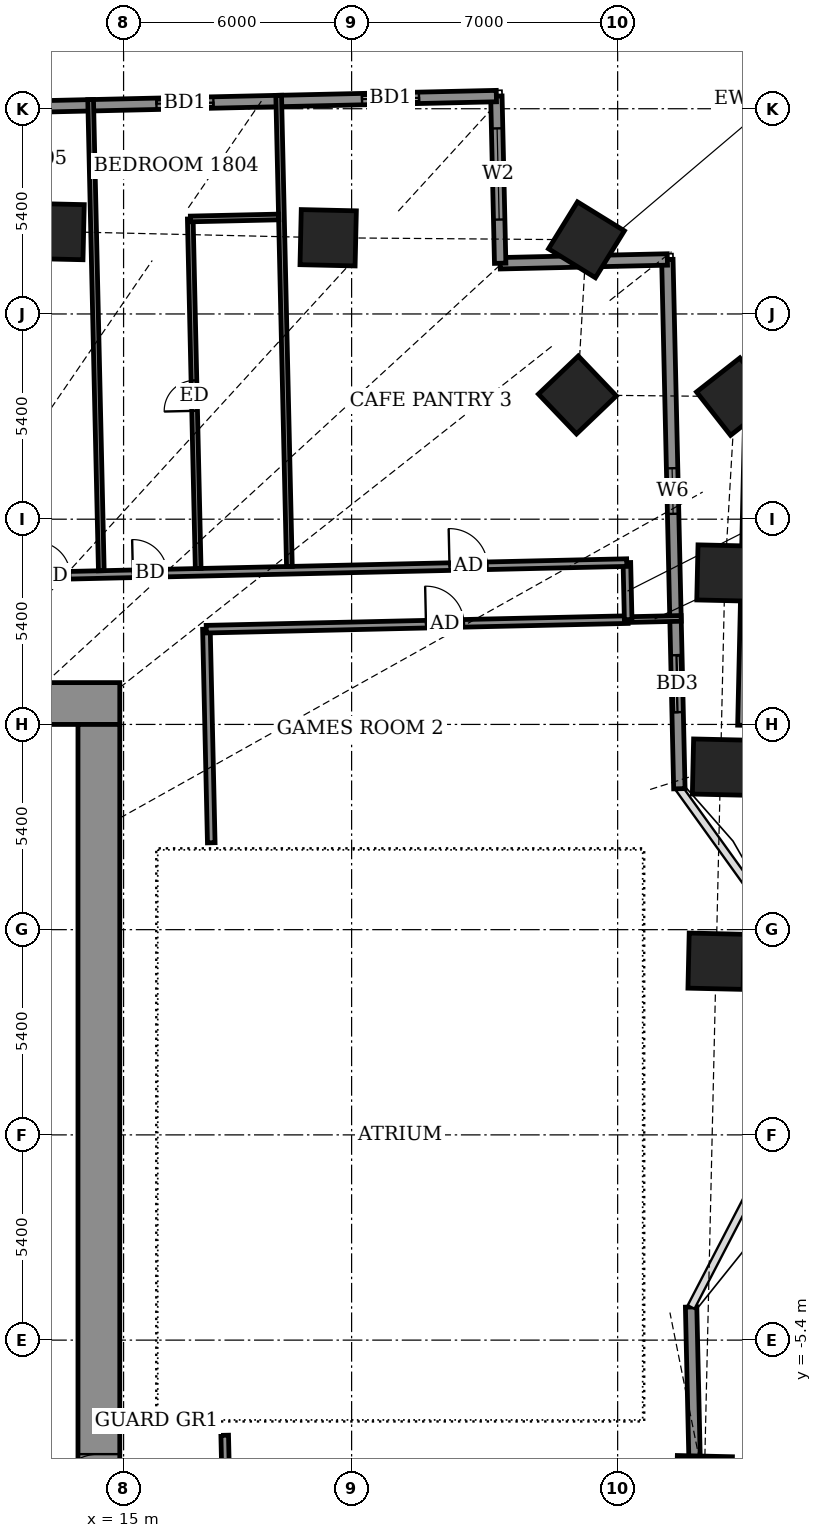
"""IFC4 building model, lengths in metres.
Left out: names, types, materials, properties, quantities, classifications, styles, units other than length and angle.
Written with IfcOpenShell. Run it as: python <this file> out.ifc"""

import sys

from ifc_helpers import new_model, si_unit, direction, frame, frame_2d, origin, origin_2d, place, context, subcontext, project, spatial, rectangle, extrude, element, fill, save


model = new_model("IFC4")
c1 = context("Model", 3, precision=1e-05, world=origin(), true_north=direction((0.0, 1.0)))
c2 = subcontext(c1, "Body", "Model", "MODEL_VIEW")
j1 = project(units=[si_unit("LENGTHUNIT", "METRE"), si_unit("PLANEANGLEUNIT", "RADIAN")], contexts=[c1])
p1 = place(None, origin())
s1 = spatial("IfcSite", under=j1, at=p1, CompositionType="ELEMENT")
p2 = place(p1, origin())
s2 = spatial("IfcBuilding", under=s1, at=p2, CompositionType="ELEMENT")
p3 = place(p2, frame((0.0, 0.0, 74.7)))
s3 = spatial("IfcBuildingStorey", under=s2, at=p3, CompositionType="ELEMENT", Elevation=74.7)
for number, where, z_axis, x_axis in (
    (1, (30.279, -9.177, -0.55), (0.0, 0.0, 1.0), (0.023, 1.0, 0.0)),
    (2, (30.591, 4.569, -0.55), (0.0, 0.0, 1.0), (0.023, 1.0, 0.0)),
    (3, (30.707, 9.677, -0.55), (0.0, 0.0, 1.0), (0.023, 1.0, 0.0)),
    (4, (30.823, 14.783, -0.55), (0.0, 0.0, 1.0), (0.023, 1.0, 0.0)),
    (5, (31.094, 19.425, -0.55), (0.0, 0.0, 1.0), (-0.617, 0.787, 0.0)),
    (6, (26.941, 19.468, -0.55), (0.0, 0.0, 1.0), (-0.691, 0.723, 0.0)),
    (7, (27.179, 23.551, -0.55), (0.0, 0.0, 1.0), (-0.851, 0.525, 0.0)),
    (8, (20.384, 23.605, -0.55), (0.0, 0.0, 1.0), (-1.0, 0.023, 0.0)),
    (9, (13.224, 23.768, -0.55), (0.0, 0.0, 1.0), (-1.0, 0.023, 0.0)),
):
    element("IfcColumn", number, at=place(p3, frame(where, z_axis=z_axis, x_axis=x_axis)), inside=s3, PredefinedType="COLUMN", context=c2, shape_type="SweptSolid", body=[
        extrude(rectangle(XDim=1.45, YDim=1.45, at=origin_2d()), origin(), (0.0, 0.0, 1.0), 4.6),
    ])
p4 = place(p3, frame((30.227, -17.455, 0.0), z_axis=(0.0, 0.0, 1.0), x_axis=(-0.022734702163, 0.999741533256, 0.0)))
e10 = element("IfcWall", 10, at=p4, inside=s3, PredefinedType="SOLIDWALL", context=c2, shape_type="SweptSolid", body=[
    extrude(rectangle(XDim=12.929, YDim=0.3, at=frame_2d((6.465, 0.0))), origin(), (0.0, 0.0, 1.0), 2.45),
])
p5 = place(p4, frame((2.863, 0.0, 0.0)))
e11 = element("IfcOpeningElement", 11, at=p5, cuts=e10, PredefinedType="OPENING", context=c2, shape_type="SweptSolid", body=[
    extrude(rectangle(XDim=1.5, YDim=2.4, at=frame_2d((0.75, 1.2))), frame((0.0, 0.16, 0.0), z_axis=(0.0, -1.0, 0.0), x_axis=(1.0, 0.0, 0.0)), (0.0, 0.0, 1.0), 0.32),
])
p6 = place(p4, frame((6.059, 0.0, 0.9)))
e12 = element("IfcOpeningElement", 12, at=p6, cuts=e10, PredefinedType="OPENING", context=c2, shape_type="SweptSolid", body=[
    extrude(rectangle(XDim=1.2, YDim=1.5, at=frame_2d((0.6, 0.75))), frame((0.0, 0.16, 0.0), z_axis=(0.0, -1.0, 0.0), x_axis=(1.0, 0.0, 0.0)), (0.0, 0.0, 1.0), 0.32),
])
p7 = place(p3, frame((29.624, 9.108, 0.0), z_axis=(0.0, 0.0, 1.0), x_axis=(-0.022679601751, 0.999742784752, 0.0)))
e13 = element("IfcWall", 13, at=p7, inside=s3, PredefinedType="SOLIDWALL", context=c2, shape_type="SweptSolid", body=[
    extrude(rectangle(XDim=13.93, YDim=0.3, at=frame_2d((6.965, 0.0))), origin(), (0.0, 0.0, 1.0), 2.25),
])
p8 = place(p7, frame((2.015, 0.0, 0.0)))
e14 = element("IfcOpeningElement", 14, at=p8, cuts=e13, PredefinedType="OPENING", context=c2, shape_type="SweptSolid", body=[
    extrude(rectangle(XDim=1.5, YDim=2.0, at=frame_2d((0.75, 1.0))), frame((0.0, 0.16, 0.0), z_axis=(0.0, -1.0, 0.0), x_axis=(1.0, 0.0, 0.0)), (0.0, 0.0, 1.0), 0.32),
])
p9 = place(p7, frame((7.235, 0.0, 0.5)))
e15 = element("IfcOpeningElement", 15, at=p9, cuts=e13, PredefinedType="OPENING", context=c2, shape_type="SweptSolid", body=[
    extrude(rectangle(XDim=1.2, YDim=1.1, at=frame_2d((0.6, 0.55))), frame((0.0, 0.16, 0.0), z_axis=(0.0, -1.0, 0.0), x_axis=(1.0, 0.0, 0.0)), (0.0, 0.0, 1.0), 0.32),
])
p10 = place(p3, frame((29.308, 23.034, 0.0), z_axis=(0.0, 0.0, 1.0), x_axis=(-0.999742493928, -0.022692418004, 0.0)))
e16 = element("IfcWall", 16, at=p10, inside=s3, PredefinedType="SOLIDWALL", context=c2, shape_type="SweptSolid", body=[
    extrude(rectangle(XDim=4.4, YDim=0.3, at=frame_2d((2.2, 0.0))), origin(), (0.0, 0.0, 1.0), 2.45),
])
p11 = place(p3, frame((24.909, 22.934, 0.0), z_axis=(0.0, 0.0, 1.0), x_axis=(-0.022693676786, 0.999742465355, 0.0)))
e17 = element("IfcWall", 17, at=p11, inside=s3, PredefinedType="SOLIDWALL", context=c2, shape_type="SweptSolid", body=[
    extrude(rectangle(XDim=4.4, YDim=0.3, at=frame_2d((2.2, 0.0))), origin(), (0.0, 0.0, 1.0), 2.45),
])
p12 = place(p11, frame((1.15, 0.0, 0.9)))
e18 = element("IfcOpeningElement", 18, at=p12, cuts=e17, PredefinedType="OPENING", context=c2, shape_type="SweptSolid", body=[
    extrude(rectangle(XDim=2.4, YDim=1.5, at=frame_2d((1.2, 0.75))), frame((0.0, 0.16, 0.0), z_axis=(0.0, -1.0, 0.0), x_axis=(1.0, 0.0, 0.0)), (0.0, 0.0, 1.0), 0.32),
])
p13 = place(p3, frame((24.809, 27.333, 0.0), z_axis=(0.0, 0.0, 1.0), x_axis=(-0.999742489858, -0.022692597327, 0.0)))
e19 = element("IfcWall", 19, at=p13, inside=s3, PredefinedType="SOLIDWALL", context=c2, shape_type="SweptSolid", body=[
    extrude(rectangle(XDim=46.972, YDim=0.3, at=frame_2d((23.486, 0.0))), origin(), (0.0, 0.0, 1.0), 2.45),
])
p14 = place(p13, frame((2.036, 0.0, 0.0)))
e20 = element("IfcOpeningElement", 20, at=p14, cuts=e19, PredefinedType="OPENING", context=c2, shape_type="SweptSolid", body=[
    extrude(rectangle(XDim=1.5, YDim=2.4, at=frame_2d((0.75, 1.2))), frame((0.0, 0.16, 0.0), z_axis=(0.0, -1.0, 0.0), x_axis=(1.0, 0.0, 0.0)), (0.0, 0.0, 1.0), 0.32),
])
p15 = place(p13, frame((7.447, 0.0, 0.0)))
e21 = element("IfcOpeningElement", 21, at=p15, cuts=e19, PredefinedType="OPENING", context=c2, shape_type="SweptSolid", body=[
    extrude(rectangle(XDim=1.5, YDim=2.4, at=frame_2d((0.75, 1.2))), frame((0.0, 0.16, 0.0), z_axis=(0.0, -1.0, 0.0), x_axis=(1.0, 0.0, 0.0)), (0.0, 0.0, 1.0), 0.32),
])
p16 = place(p13, frame((12.397, 0.0, 0.0)))
e22 = element("IfcOpeningElement", 22, at=p16, cuts=e19, PredefinedType="OPENING", context=c2, shape_type="SweptSolid", body=[
    extrude(rectangle(XDim=1.5, YDim=2.4, at=frame_2d((0.75, 1.2))), frame((0.0, 0.16, 0.0), z_axis=(0.0, -1.0, 0.0), x_axis=(1.0, 0.0, 0.0)), (0.0, 0.0, 1.0), 0.32),
])
p17 = place(p13, frame((17.347, 0.0, 0.0)))
e23 = element("IfcOpeningElement", 23, at=p17, cuts=e19, PredefinedType="OPENING", context=c2, shape_type="SweptSolid", body=[
    extrude(rectangle(XDim=1.5, YDim=2.4, at=frame_2d((0.75, 1.2))), frame((0.0, 0.16, 0.0), z_axis=(0.0, -1.0, 0.0), x_axis=(1.0, 0.0, 0.0)), (0.0, 0.0, 1.0), 0.32),
])
p18 = place(p13, frame((22.297, 0.0, 0.0)))
e24 = element("IfcOpeningElement", 24, at=p18, cuts=e19, PredefinedType="OPENING", context=c2, shape_type="SweptSolid", body=[
    extrude(rectangle(XDim=1.5, YDim=2.4, at=frame_2d((0.75, 1.2))), frame((0.0, 0.16, 0.0), z_axis=(0.0, -1.0, 0.0), x_axis=(1.0, 0.0, 0.0)), (0.0, 0.0, 1.0), 0.32),
])
p19 = place(p13, frame((27.772, 0.0, 0.0)))
e25 = element("IfcOpeningElement", 25, at=p19, cuts=e19, PredefinedType="OPENING", context=c2, shape_type="SweptSolid", body=[
    extrude(rectangle(XDim=1.5, YDim=2.4, at=frame_2d((0.75, 1.2))), frame((0.0, 0.16, 0.0), z_axis=(0.0, -1.0, 0.0), x_axis=(1.0, 0.0, 0.0)), (0.0, 0.0, 1.0), 0.32),
])
p20 = place(p13, frame((33.997, 0.0, 0.9)))
e26 = element("IfcOpeningElement", 26, at=p20, cuts=e19, PredefinedType="OPENING", context=c2, shape_type="SweptSolid", body=[
    extrude(rectangle(XDim=2.4, YDim=1.5, at=frame_2d((1.2, 0.75))), frame((0.0, 0.16, 0.0), z_axis=(0.0, -1.0, 0.0), x_axis=(1.0, 0.0, 0.0)), (0.0, 0.0, 1.0), 0.32),
])
p21 = place(p13, frame((41.797, 0.0, 0.9)))
e27 = element("IfcOpeningElement", 27, at=p21, cuts=e19, PredefinedType="OPENING", context=c2, shape_type="SweptSolid", body=[
    extrude(rectangle(XDim=2.4, YDim=1.5, at=frame_2d((1.2, 0.75))), frame((0.0, 0.16, 0.0), z_axis=(0.0, -1.0, 0.0), x_axis=(1.0, 0.0, 0.0)), (0.0, 0.0, 1.0), 0.32),
])
p22 = place(p3, frame((31.503, 19.377, 0.0), z_axis=(0.0, 0.0, 1.0), x_axis=(-0.022648553695, -0.999743488609, 0.0)))
e28 = element("IfcWall", 28, at=p22, inside=s3, PredefinedType="PARAPET", context=c2, shape_type="SweptSolid", body=[
    extrude(rectangle(XDim=8.602, YDim=0.3, at=frame_2d((4.301, 0.0))), origin(), (0.0, 0.0, 1.0), 0.9),
])
p23 = place(p3, frame((17.757, -12.137, 0.0), z_axis=(0.0, 0.0, 1.0), x_axis=(-0.022718785711, 0.999741895079, 0.0)))
e29 = element("IfcWall", 29, at=p23, inside=s3, PredefinedType="PARTITIONING", context=c2, shape_type="SweptSolid", body=[
    extrude(rectangle(XDim=4.234, YDim=0.2, at=frame_2d((2.117, 0.0))), origin(), (0.0, 0.0, 1.0), 2.25),
])
p24 = place(p3, frame((17.307, 7.686, 0.0), z_axis=(0.0, 0.0, 1.0), x_axis=(-0.022584272568, 0.999744942789, 0.0)))
e30 = element("IfcWall", 30, at=p24, inside=s3, PredefinedType="PARTITIONING", context=c2, shape_type="SweptSolid", body=[
    extrude(rectangle(XDim=5.621, YDim=0.2, at=frame_2d((2.811, 0.0))), origin(), (0.0, 0.0, 1.0), 2.25),
])
p25 = place(p3, frame((17.176, 13.306, 0.0), z_axis=(0.0, 0.0, 1.0), x_axis=(0.9997418469, 0.022720905723, 0.0)))
e31 = element("IfcWall", 31, at=p25, inside=s3, PredefinedType="PARTITIONING", context=c2, shape_type="SweptSolid", body=[
    extrude(rectangle(XDim=11.1, YDim=0.2, at=frame_2d((5.55, 0.0))), origin(), (0.0, 0.0, 1.0), 2.25),
])
p26 = place(p25, frame((5.783, 0.0, 0.0)))
e32 = element("IfcOpeningElement", 32, at=p26, cuts=e31, PredefinedType="OPENING", context=c2, shape_type="SweptSolid", body=[
    extrude(rectangle(XDim=1.0, YDim=2.1, at=frame_2d((0.5, 1.05))), frame((0.0, 0.11, 0.0), z_axis=(0.0, -1.0, 0.0), x_axis=(1.0, 0.0, 0.0)), (0.0, 0.0, 1.0), 0.22),
])
p27 = place(p3, frame((28.273, 13.558, 0.0), z_axis=(0.0, 0.0, 1.0), x_axis=(0.99973885505, 0.022852170653, 0.0)))
e33 = element("IfcWall", 33, at=p27, inside=s3, PredefinedType="PARTITIONING", context=c2, shape_type="SweptSolid", body=[
    extrude(rectangle(XDim=1.399, YDim=0.15, at=frame_2d((0.7, 0.0))), origin(), (0.0, 0.0, 1.0), 4.05),
])
p28 = place(p3, frame((28.277, 13.558, 0.0), z_axis=(0.0, 0.0, 1.0), x_axis=(-0.022780545013, 0.999740489712, 0.0)))
e34 = element("IfcWall", 34, at=p28, inside=s3, PredefinedType="PARTITIONING", context=c2, shape_type="SweptSolid", body=[
    extrude(rectangle(XDim=1.5, YDim=0.2, at=frame_2d((0.75, 0.0))), origin(), (0.0, 0.0, 1.0), 2.25),
])
p29 = place(p3, frame((-25.525, 13.838, 0.0), z_axis=(0.0, 0.0, 1.0), x_axis=(0.999742549888, 0.022689952476, 0.0)))
e35 = element("IfcWall", 35, at=p29, inside=s3, PredefinedType="PARTITIONING", context=c2, shape_type="SweptSolid", body=[
    extrude(rectangle(XDim=53.778, YDim=0.2, at=frame_2d((26.889, 0.0))), origin(), (0.0, 0.0, 1.0), 2.25),
])
p30 = place(p29, frame((49.114, 0.0, 0.0)))
e36 = element("IfcOpeningElement", 36, at=p30, cuts=e35, PredefinedType="OPENING", context=c2, shape_type="SweptSolid", body=[
    extrude(rectangle(XDim=1.0, YDim=2.1, at=frame_2d((0.5, 1.05))), frame((0.0, 0.11, 0.0), z_axis=(0.0, -1.0, 0.0), x_axis=(1.0, 0.0, 0.0)), (0.0, 0.0, 1.0), 0.22),
])
p31 = place(p29, frame((40.781, 0.0, 0.0)))
e37 = element("IfcOpeningElement", 37, at=p31, cuts=e35, PredefinedType="OPENING", context=c2, shape_type="SweptSolid", body=[
    extrude(rectangle(XDim=0.9, YDim=2.1, at=frame_2d((0.45, 1.05))), frame((0.0, 0.11, 0.0), z_axis=(0.0, -1.0, 0.0), x_axis=(1.0, 0.0, 0.0)), (0.0, 0.0, 1.0), 0.22),
])
p32 = place(p29, frame((38.231, 0.0, 0.0)))
e38 = element("IfcOpeningElement", 38, at=p32, cuts=e35, PredefinedType="OPENING", context=c2, shape_type="SweptSolid", body=[
    extrude(rectangle(XDim=0.9, YDim=2.1, at=frame_2d((0.45, 1.05))), frame((0.0, 0.11, 0.0), z_axis=(0.0, -1.0, 0.0), x_axis=(1.0, 0.0, 0.0)), (0.0, 0.0, 1.0), 0.22),
])
p33 = place(p29, frame((30.881, 0.0, 0.0)))
e39 = element("IfcOpeningElement", 39, at=p33, cuts=e35, PredefinedType="OPENING", context=c2, shape_type="SweptSolid", body=[
    extrude(rectangle(XDim=0.9, YDim=2.1, at=frame_2d((0.45, 1.05))), frame((0.0, 0.11, 0.0), z_axis=(0.0, -1.0, 0.0), x_axis=(1.0, 0.0, 0.0)), (0.0, 0.0, 1.0), 0.22),
])
p34 = place(p29, frame((28.331, 0.0, 0.0)))
e40 = element("IfcOpeningElement", 40, at=p34, cuts=e35, PredefinedType="OPENING", context=c2, shape_type="SweptSolid", body=[
    extrude(rectangle(XDim=0.9, YDim=2.1, at=frame_2d((0.45, 1.05))), frame((0.0, 0.11, 0.0), z_axis=(0.0, -1.0, 0.0), x_axis=(1.0, 0.0, 0.0)), (0.0, 0.0, 1.0), 0.22),
])
p35 = place(p29, frame((20.406, 0.0, 0.0)))
e41 = element("IfcOpeningElement", 41, at=p35, cuts=e35, PredefinedType="OPENING", context=c2, shape_type="SweptSolid", body=[
    extrude(rectangle(XDim=1.0, YDim=2.1, at=frame_2d((0.5, 1.05))), frame((0.0, 0.11, 0.0), z_axis=(0.0, -1.0, 0.0), x_axis=(1.0, 0.0, 0.0)), (0.0, 0.0, 1.0), 0.22),
])
p36 = place(p29, frame((23.456, 0.0, 0.0)))
e42 = element("IfcOpeningElement", 42, at=p36, cuts=e35, PredefinedType="OPENING", context=c2, shape_type="SweptSolid", body=[
    extrude(rectangle(XDim=0.9, YDim=2.1, at=frame_2d((0.45, 1.05))), frame((0.0, 0.11, 0.0), z_axis=(0.0, -1.0, 0.0), x_axis=(1.0, 0.0, 0.0)), (0.0, 0.0, 1.0), 0.22),
])
p37 = place(p29, frame((14.931, 0.0, 0.0)))
e43 = element("IfcOpeningElement", 43, at=p37, cuts=e35, PredefinedType="OPENING", context=c2, shape_type="SweptSolid", body=[
    extrude(rectangle(XDim=1.0, YDim=2.1, at=frame_2d((0.5, 1.05))), frame((0.0, 0.11, 0.0), z_axis=(0.0, -1.0, 0.0), x_axis=(1.0, 0.0, 0.0)), (0.0, 0.0, 1.0), 0.22),
])
p38 = place(p29, frame((3.331, 0.0, 0.0)))
e44 = element("IfcOpeningElement", 44, at=p38, cuts=e35, PredefinedType="OPENING", context=c2, shape_type="SweptSolid", body=[
    extrude(rectangle(XDim=1.0, YDim=2.1, at=frame_2d((0.5, 1.05))), frame((0.0, 0.11, 0.0), z_axis=(0.0, -1.0, 0.0), x_axis=(1.0, 0.0, 0.0)), (0.0, 0.0, 1.0), 0.22),
])
p39 = place(p29, frame((10.006, 0.0, 0.0)))
e45 = element("IfcOpeningElement", 45, at=p39, cuts=e35, PredefinedType="OPENING", context=c2, shape_type="SweptSolid", body=[
    extrude(rectangle(XDim=0.9, YDim=2.1, at=frame_2d((0.45, 1.05))), frame((0.0, 0.11, 0.0), z_axis=(0.0, -1.0, 0.0), x_axis=(1.0, 0.0, 0.0)), (0.0, 0.0, 1.0), 0.22),
])
p40 = place(p3, frame((14.414, 14.844, 0.0), z_axis=(0.0, 0.0, 1.0), x_axis=(-0.022661475803, 0.999743195783, 0.0)))
e46 = element("IfcWall", 46, at=p40, inside=s3, PredefinedType="PARTITIONING", context=c2, shape_type="SweptSolid", body=[
    extrude(rectangle(XDim=12.4, YDim=0.15, at=frame_2d((6.2, 0.0))), origin(), (0.0, 0.0, 1.0), 2.45),
])
p41 = place(p3, frame((16.963, 14.902, 0.0), z_axis=(0.0, 0.0, 1.0), x_axis=(-0.022608685365, 0.999744391005, 0.0)))
e47 = element("IfcWall", 47, at=p41, inside=s3, PredefinedType="PARTITIONING", context=c2, shape_type="SweptSolid", body=[
    extrude(rectangle(XDim=9.2, YDim=0.15, at=frame_2d((4.6, 0.0))), origin(), (0.0, 0.0, 1.0), 2.35),
])
p42 = place(p41, frame((4.15, 0.0, 0.0)))
e48 = element("IfcOpeningElement", 48, at=p42, cuts=e47, PredefinedType="OPENING", context=c2, shape_type="SweptSolid", body=[
    extrude(rectangle(XDim=0.8, YDim=2.1, at=frame_2d((0.4, 1.05))), frame((0.0, 0.085, 0.0), z_axis=(0.0, -1.0, 0.0), x_axis=(1.0, 0.0, 0.0)), (0.0, 0.0, 1.0), 0.17),
])
p43 = place(p3, frame((19.363, 14.956, 0.0), z_axis=(0.0, 0.0, 1.0), x_axis=(-0.022740189192, 0.999741408463, 0.0)))
e49 = element("IfcWall", 49, at=p43, inside=s3, PredefinedType="PARTITIONING", context=c2, shape_type="SweptSolid", body=[
    extrude(rectangle(XDim=12.4, YDim=0.15, at=frame_2d((6.2, 0.0))), origin(), (0.0, 0.0, 1.0), 2.35),
])
p44 = place(p3, frame((16.759, 24.1, 0.0), z_axis=(0.0, 0.0, 1.0), x_axis=(0.999749744571, 0.022370700241, 0.0)))
e50 = element("IfcWall", 50, at=p44, inside=s3, PredefinedType="PARTITIONING", context=c2, shape_type="SweptSolid", body=[
    extrude(rectangle(XDim=2.324, YDim=0.15, at=frame_2d((1.162, 0.0))), origin(), (0.0, 0.0, 1.0), 2.45),
])
p45 = place(p3, frame((-14.9, 11.35, 0.0), z_axis=(0.0, 0.0, 1.0), x_axis=(1.0, 0.0, 0.0)))
e51 = element("IfcWall", 51, at=p45, inside=s3, PredefinedType="SHEAR", context=c2, shape_type="SweptSolid", body=[
    extrude(rectangle(XDim=29.8, YDim=1.1, at=frame_2d((14.9, 0.0))), origin(), (0.0, 0.0, 1.0), 4.6),
])
p46 = place(p3, frame((14.35, -10.8, 0.0), z_axis=(0.0, 0.0, 1.0), x_axis=(0.0, 1.0, 0.0)))
e52 = element("IfcWall", 52, at=p46, inside=s3, PredefinedType="SHEAR", context=c2, shape_type="SweptSolid", body=[
    extrude(rectangle(XDim=21.6, YDim=1.1, at=frame_2d((10.8, 0.0))), origin(), (0.0, 0.0, 1.0), 4.6),
])
p47 = place(p46, frame((1.2, 0.0, 0.0)))
e53 = element("IfcOpeningElement", 53, at=p47, cuts=e52, PredefinedType="OPENING", context=c2, shape_type="SweptSolid", body=[
    extrude(rectangle(XDim=1.2, YDim=2.1, at=frame_2d((0.6, 1.05))), frame((0.0, 0.56, 0.0), z_axis=(0.0, -1.0, 0.0), x_axis=(1.0, 0.0, 0.0)), (0.0, 0.0, 1.0), 1.12),
])
p48 = place(p8, origin())
e54 = element("IfcDoor", 54, at=p48, inside=s3, OperationType="SLIDING_TO_LEFT", PredefinedType="DOOR", context=c2, shape_type="SweptSolid", body=[
    extrude(rectangle(XDim=1.5, YDim=2.0, at=frame_2d((0.75, 1.0))), frame((0.0, 0.025, 0.0), z_axis=(0.0, -1.0, 0.0), x_axis=(1.0, 0.0, 0.0)), (0.0, 0.0, 1.0), 0.05),
])
fill(e14, e54)
p49 = place(p9, origin())
e55 = element("IfcWindow", 55, at=p49, inside=s3, PartitioningType="SINGLE_PANEL", PredefinedType="WINDOW", context=c2, shape_type="SweptSolid", body=[
    extrude(rectangle(XDim=1.2, YDim=1.1, at=frame_2d((0.6, 0.55))), frame((0.0, 0.03, 0.0), z_axis=(0.0, -1.0, 0.0), x_axis=(1.0, 0.0, 0.0)), (0.0, 0.0, 1.0), 0.06),
])
fill(e15, e55)
p50 = place(p12, origin())
e56 = element("IfcWindow", 56, at=p50, inside=s3, PartitioningType="DOUBLE_PANEL_VERTICAL", PredefinedType="WINDOW", context=c2, shape_type="SweptSolid", body=[
    extrude(rectangle(XDim=2.4, YDim=1.5, at=frame_2d((1.2, 0.75))), frame((0.0, 0.03, 0.0), z_axis=(0.0, -1.0, 0.0), x_axis=(1.0, 0.0, 0.0)), (0.0, 0.0, 1.0), 0.06),
])
fill(e18, e56)
p51 = place(p14, origin())
e57 = element("IfcDoor", 57, at=p51, inside=s3, OperationType="SLIDING_TO_LEFT", PredefinedType="DOOR", context=c2, shape_type="SweptSolid", body=[
    extrude(rectangle(XDim=1.5, YDim=2.4, at=frame_2d((0.75, 1.2))), frame((0.0, 0.025, 0.0), z_axis=(0.0, -1.0, 0.0), x_axis=(1.0, 0.0, 0.0)), (0.0, 0.0, 1.0), 0.05),
])
fill(e20, e57)
p52 = place(p15, origin())
e58 = element("IfcDoor", 58, at=p52, inside=s3, OperationType="SLIDING_TO_LEFT", PredefinedType="DOOR", context=c2, shape_type="SweptSolid", body=[
    extrude(rectangle(XDim=1.5, YDim=2.4, at=frame_2d((0.75, 1.2))), frame((0.0, 0.025, 0.0), z_axis=(0.0, -1.0, 0.0), x_axis=(1.0, 0.0, 0.0)), (0.0, 0.0, 1.0), 0.05),
])
fill(e21, e58)
p53 = place(p26, origin())
e59 = element("IfcDoor", 59, at=p53, inside=s3, OperationType="SINGLE_SWING_LEFT", PredefinedType="DOOR", context=c2, shape_type="SweptSolid", body=[
    extrude(rectangle(XDim=1.0, YDim=2.1, at=frame_2d((0.5, 1.05))), frame((0.0, 0.025, 0.0), z_axis=(0.0, -1.0, 0.0), x_axis=(1.0, 0.0, 0.0)), (0.0, 0.0, 1.0), 0.05),
])
fill(e32, e59)
p54 = place(p30, origin())
e60 = element("IfcDoor", 60, at=p54, inside=s3, OperationType="SINGLE_SWING_RIGHT", PredefinedType="DOOR", context=c2, shape_type="SweptSolid", body=[
    extrude(rectangle(XDim=1.0, YDim=2.1, at=frame_2d((0.5, 1.05))), frame((0.0, 0.025, 0.0), z_axis=(0.0, -1.0, 0.0), x_axis=(1.0, 0.0, 0.0)), (0.0, 0.0, 1.0), 0.05),
])
fill(e36, e60)
p55 = place(p31, origin())
e61 = element("IfcDoor", 61, at=p55, inside=s3, OperationType="SINGLE_SWING_RIGHT", PredefinedType="DOOR", context=c2, shape_type="SweptSolid", body=[
    extrude(rectangle(XDim=0.9, YDim=2.1, at=frame_2d((0.45, 1.05))), frame((0.0, 0.025, 0.0), z_axis=(0.0, -1.0, 0.0), x_axis=(1.0, 0.0, 0.0)), (0.0, 0.0, 1.0), 0.05),
])
fill(e37, e61)
p56 = place(p42, origin())
e62 = element("IfcDoor", 62, at=p56, inside=s3, OperationType="SINGLE_SWING_RIGHT", PredefinedType="DOOR", context=c2, shape_type="SweptSolid", body=[
    extrude(rectangle(XDim=0.8, YDim=2.1, at=frame_2d((0.4, 1.05))), frame((0.0, 0.025, 0.0), z_axis=(0.0, -1.0, 0.0), x_axis=(1.0, 0.0, 0.0)), (0.0, 0.0, 1.0), 0.05),
])
fill(e48, e62)
p57 = place(p32, origin())
e63 = element("IfcDoor", 63, at=p57, inside=s3, OperationType="SINGLE_SWING_LEFT", PredefinedType="DOOR", context=c2, shape_type="SweptSolid", body=[
    extrude(rectangle(XDim=0.9, YDim=2.1, at=frame_2d((0.45, 1.05))), frame((0.0, 0.025, 0.0), z_axis=(0.0, -1.0, 0.0), x_axis=(1.0, 0.0, 0.0)), (0.0, 0.0, 1.0), 0.05),
])
fill(e38, e63)
p58 = place(p47, origin())
e64 = element("IfcDoor", 64, at=p58, inside=s3, OperationType="DOUBLE_DOOR_SINGLE_SWING", PredefinedType="DOOR", context=c2, shape_type="SweptSolid", body=[
    extrude(rectangle(XDim=1.2, YDim=2.1, at=frame_2d((0.6, 1.05))), frame((0.0, 0.025, 0.0), z_axis=(0.0, -1.0, 0.0), x_axis=(1.0, 0.0, 0.0)), (0.0, 0.0, 1.0), 0.05),
])
fill(e53, e64)
save(model, sys.argv[1])
